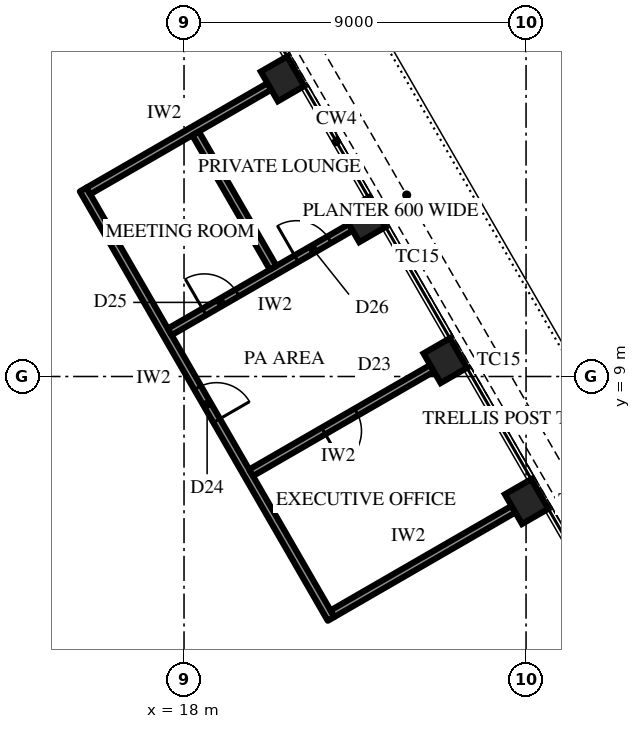
"""IFC4 building model, lengths in metres.
Left out: names, types, materials, properties, quantities, classifications, styles, units other than length and angle.
Written with IfcOpenShell. Run it as: python <this file> out.ifc"""

import sys

from ifc_helpers import new_model, si_unit, direction, frame, frame_2d, origin, origin_2d, place, context, subcontext, project, spatial, rectangle, extrude, element, fill, save


model = new_model("IFC4")
c1 = context("Model", 3, precision=1e-05, world=origin(), true_north=direction((0.0, 1.0)))
c2 = subcontext(c1, "Body", "Model", "MODEL_VIEW")
j1 = project(units=[si_unit("LENGTHUNIT", "METRE"), si_unit("PLANEANGLEUNIT", "RADIAN")], contexts=[c1])
p1 = place(None, origin())
s1 = spatial("IfcSite", under=j1, at=p1, CompositionType="ELEMENT")
p2 = place(p1, origin())
s2 = spatial("IfcBuilding", under=s1, at=p2, CompositionType="ELEMENT")
p3 = place(p2, frame((0.0, 0.0, 370.3)))
s3 = spatial("IfcBuildingStorey", under=s2, at=p3, CompositionType="ELEMENT", Elevation=370.3)
for number, where, z_axis, x_axis in (
    (1, (27.015, 5.708, 0.0), (0.0, 0.0, 1.0), (-0.5, 0.866, 0.0)),
    (2, (24.874, 9.417, 0.0), (0.0, 0.0, 1.0), (-0.5, 0.866, 0.0)),
    (3, (22.733, 13.125, 0.0), (0.0, 0.0, 1.0), (-0.5, 0.866, 0.0)),
    (4, (20.592, 16.833, 0.0), (0.0, 0.0, 1.0), (-0.5, 0.866, 0.0)),
):
    element("IfcColumn", number, at=place(p3, frame(where, z_axis=z_axis, x_axis=x_axis)), inside=s3, PredefinedType="COLUMN", context=c2, shape_type="SweptSolid", body=[
        extrude(rectangle(XDim=0.9, YDim=0.8, at=origin_2d()), origin(), (0.0, 0.0, 1.0), 4.2),
    ])
p4 = place(p3, frame((21.869, 2.622, 0.0), z_axis=(0.0, 0.0, 1.0), x_axis=(-0.500013496215, 0.866017611601, 0.0)))
e5 = element("IfcWall", 5, at=p4, inside=s3, PredefinedType="PARTITIONING", context=c2, shape_type="SweptSolid", body=[
    extrude(rectangle(XDim=13.046, YDim=0.2, at=frame_2d((6.523, 0.0))), origin(), (0.0, 0.0, 1.0), 4.0),
])
p5 = place(p4, frame((6.023, 0.0, 0.0)))
e6 = element("IfcOpeningElement", 6, at=p5, cuts=e5, PredefinedType="OPENING", context=c2, shape_type="SweptSolid", body=[
    extrude(rectangle(XDim=1.0, YDim=2.2, at=frame_2d((0.5, 1.1))), frame((0.0, 0.11, 0.0), z_axis=(0.0, -1.0, 0.0), x_axis=(1.0, 0.0, 0.0)), (0.0, 0.0, 1.0), 0.22),
])
p6 = place(p3, frame((21.906, 2.758, 0.0), z_axis=(0.0, 0.0, 1.0), x_axis=(0.866027397988, 0.499996545922, 0.0)))
e7 = element("IfcWall", 7, at=p6, inside=s3, PredefinedType="PARTITIONING", context=c2, shape_type="SweptSolid", body=[
    extrude(rectangle(XDim=5.5, YDim=0.2, at=frame_2d((2.75, 0.0))), origin(), (0.0, 0.0, 1.0), 3.082),
])
p7 = place(p3, frame((19.765, 6.467, 0.0), z_axis=(0.0, 0.0, 1.0), x_axis=(0.866027397988, 0.499996545922, 0.0)))
e8 = element("IfcWall", 8, at=p7, inside=s3, PredefinedType="PARTITIONING", context=c2, shape_type="SweptSolid", body=[
    extrude(rectangle(XDim=5.5, YDim=0.2, at=frame_2d((2.75, 0.0))), origin(), (0.0, 0.0, 1.0), 2.992),
])
p8 = place(p7, frame((2.2, 0.0, 0.0)))
e9 = element("IfcOpeningElement", 9, at=p8, cuts=e8, PredefinedType="OPENING", context=c2, shape_type="SweptSolid", body=[
    extrude(rectangle(XDim=1.0, YDim=2.2, at=frame_2d((0.5, 1.1))), frame((0.0, 0.11, 0.0), z_axis=(0.0, -1.0, 0.0), x_axis=(1.0, 0.0, 0.0)), (0.0, 0.0, 1.0), 0.22),
])
p9 = place(p3, frame((17.624, 10.175, 0.0), z_axis=(0.0, 0.0, 1.0), x_axis=(0.866027397988, 0.499996545922, 0.0)))
e10 = element("IfcWall", 10, at=p9, inside=s3, PredefinedType="PARTITIONING", context=c2, shape_type="SweptSolid", body=[
    extrude(rectangle(XDim=5.5, YDim=0.2, at=frame_2d((2.75, 0.0))), origin(), (0.0, 0.0, 1.0), 3.082),
])
p10 = place(p9, frame((1.05, 0.0, 0.0)))
e11 = element("IfcOpeningElement", 11, at=p10, cuts=e10, PredefinedType="OPENING", context=c2, shape_type="SweptSolid", body=[
    extrude(rectangle(XDim=1.0, YDim=2.2, at=frame_2d((0.5, 1.1))), frame((0.0, 0.11, 0.0), z_axis=(0.0, -1.0, 0.0), x_axis=(1.0, 0.0, 0.0)), (0.0, 0.0, 1.0), 0.22),
])
p11 = place(p9, frame((3.85, 0.0, 0.0)))
e12 = element("IfcOpeningElement", 12, at=p11, cuts=e10, PredefinedType="OPENING", context=c2, shape_type="SweptSolid", body=[
    extrude(rectangle(XDim=1.0, YDim=2.2, at=frame_2d((0.5, 1.1))), frame((0.0, 0.11, 0.0), z_axis=(0.0, -1.0, 0.0), x_axis=(1.0, 0.0, 0.0)), (0.0, 0.0, 1.0), 0.22),
])
p12 = place(p3, frame((15.483, 13.883, 0.0), z_axis=(0.0, 0.0, 1.0), x_axis=(0.866027397988, 0.499996545922, 0.0)))
e13 = element("IfcWall", 13, at=p12, inside=s3, PredefinedType="PARTITIONING", context=c2, shape_type="SweptSolid", body=[
    extrude(rectangle(XDim=5.5, YDim=0.2, at=frame_2d((2.75, 0.0))), origin(), (0.0, 0.0, 1.0), 3.082),
])
p13 = place(p3, frame((20.345, 11.862, 0.0), z_axis=(0.0, 0.0, 1.0), x_axis=(-0.499998569178, 0.866026229868, 0.0)))
e14 = element("IfcWall", 14, at=p13, inside=s3, PredefinedType="PARTITIONING", context=c2, shape_type="SweptSolid", body=[
    extrude(rectangle(XDim=4.082, YDim=0.2, at=frame_2d((2.041, 0.0))), origin(), (0.0, 0.0, 1.0), 4.0),
])
p14 = place(p8, frame((1.0, 0.0, 0.0), z_axis=(0.0, 0.0, 1.0), x_axis=(-1.0, 0.0, 0.0)))
e15 = element("IfcDoor", 15, at=p14, inside=s3, OperationType="SINGLE_SWING_LEFT", PredefinedType="DOOR", context=c2, shape_type="SweptSolid", body=[
    extrude(rectangle(XDim=1.0, YDim=2.2, at=frame_2d((0.5, 1.1))), frame((0.0, 0.025, 0.0), z_axis=(0.0, -1.0, 0.0), x_axis=(1.0, 0.0, 0.0)), (0.0, 0.0, 1.0), 0.05),
])
fill(e9, e15)
p15 = place(p5, frame((1.0, 0.0, 0.0), z_axis=(0.0, 0.0, 1.0), x_axis=(-1.0, 0.0, 0.0)))
e16 = element("IfcDoor", 16, at=p15, inside=s3, OperationType="SINGLE_SWING_LEFT", PredefinedType="DOOR", context=c2, shape_type="SweptSolid", body=[
    extrude(rectangle(XDim=1.0, YDim=2.2, at=frame_2d((0.5, 1.1))), frame((0.0, 0.025, 0.0), z_axis=(0.0, -1.0, 0.0), x_axis=(1.0, 0.0, 0.0)), (0.0, 0.0, 1.0), 0.05),
])
fill(e6, e16)
p16 = place(p10, origin())
e17 = element("IfcDoor", 17, at=p16, inside=s3, OperationType="SINGLE_SWING_RIGHT", PredefinedType="DOOR", context=c2, shape_type="SweptSolid", body=[
    extrude(rectangle(XDim=1.0, YDim=2.2, at=frame_2d((0.5, 1.1))), frame((0.0, 0.025, 0.0), z_axis=(0.0, -1.0, 0.0), x_axis=(1.0, 0.0, 0.0)), (0.0, 0.0, 1.0), 0.05),
])
fill(e11, e17)
p17 = place(p11, origin())
e18 = element("IfcDoor", 18, at=p17, inside=s3, OperationType="SINGLE_SWING_RIGHT", PredefinedType="DOOR", context=c2, shape_type="SweptSolid", body=[
    extrude(rectangle(XDim=1.0, YDim=2.2, at=frame_2d((0.5, 1.1))), frame((0.0, 0.025, 0.0), z_axis=(0.0, -1.0, 0.0), x_axis=(1.0, 0.0, 0.0)), (0.0, 0.0, 1.0), 0.05),
])
fill(e12, e18)
save(model, sys.argv[1])
